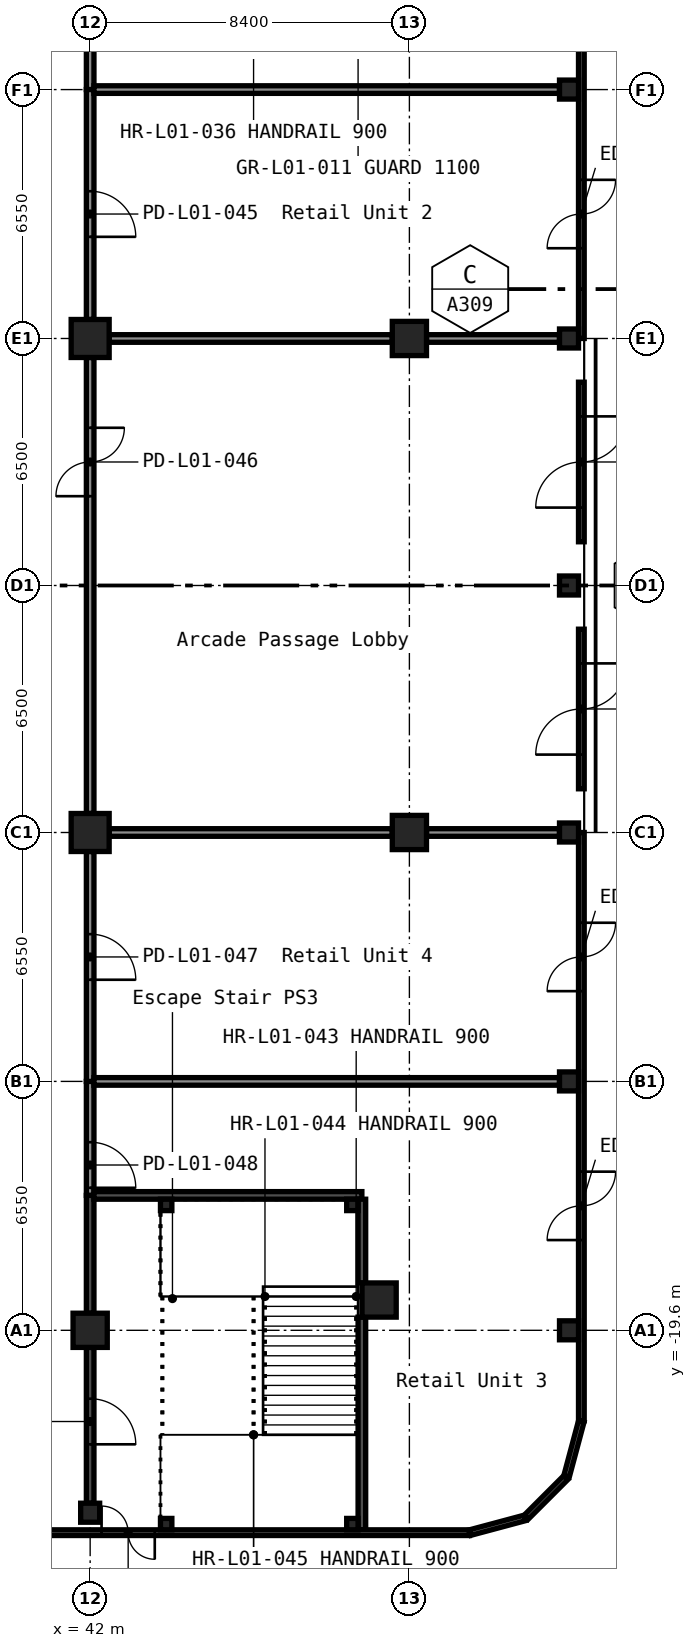
"""IFC4 building model, lengths in metres.
Left out: names, types, materials, properties, quantities, classifications, styles, units other than length and angle.
Written with IfcOpenShell. Run it as: python <this file> out.ifc"""

import sys

from ifc_helpers import new_model, si_unit, direction, frame, frame_2d, origin, origin_2d, place, context, subcontext, project, spatial, rectangle, hollow_rectangle, extrude, element, fill, save


model = new_model("IFC4")
c1 = context("Model", 3, precision=1e-05, world=origin(), true_north=direction((0.0, 1.0)))
c2 = subcontext(c1, "Body", "Model", "MODEL_VIEW")
j1 = project(units=[si_unit("LENGTHUNIT", "METRE"), si_unit("PLANEANGLEUNIT", "RADIAN")], contexts=[c1])
p1 = place(None, origin())
s1 = spatial("IfcSite", under=j1, at=p1, CompositionType="ELEMENT")
p2 = place(p1, origin())
s2 = spatial("IfcBuilding", under=s1, at=p2, CompositionType="ELEMENT")
p3 = place(p2, origin())
s3 = spatial("IfcBuildingStorey", under=s2, at=p3, CompositionType="ELEMENT", Elevation=0.0)
p4 = place(p3, frame((42.0, -19.6, -0.3), z_axis=(0.0, 0.0, 1.0), x_axis=(1.0, 0.0, 0.0)))
e1 = element("IfcColumn", 1, at=p4, inside=s3, PredefinedType="COLUMN", context=c2, shape_type="SweptSolid", body=[
    extrude(hollow_rectangle(XDim=0.9, YDim=0.9, WallThickness=0.036, at=origin_2d()), origin(), (0.0, 0.0, 1.0), 8.9),
])
for number, where, z_axis, x_axis in (
    (2, (42.0, -6.5, -0.3), (0.0, 0.0, 1.0), (1.0, 0.0, 0.0)),
    (3, (42.0, 6.5, -0.3), (0.0, 0.0, 1.0), (1.0, 0.0, 0.0)),
):
    element("IfcColumn", number, at=place(p3, frame(where, z_axis=z_axis, x_axis=x_axis)), inside=s3, PredefinedType="COLUMN", context=c2, shape_type="SweptSolid", body=[
        extrude(hollow_rectangle(XDim=1.0, YDim=1.0, WallThickness=0.04, at=origin_2d()), origin(), (0.0, 0.0, 1.0), 8.9),
    ])
for number, where, z_axis, x_axis in (
    (4, (49.603, -18.803, -0.3), (0.0, 0.0, 1.0), (1.0, 0.0, 0.0)),
    (5, (50.4, -6.5, -0.3), (0.0, 0.0, 1.0), (1.0, 0.0, 0.0)),
    (6, (50.4, 6.5, -0.3), (0.0, 0.0, 1.0), (1.0, 0.0, 0.0)),
):
    element("IfcColumn", number, at=place(p3, frame(where, z_axis=z_axis, x_axis=x_axis)), inside=s3, PredefinedType="COLUMN", context=c2, shape_type="SweptSolid", body=[
        extrude(hollow_rectangle(XDim=0.9, YDim=0.9, WallThickness=0.036, at=origin_2d()), origin(), (0.0, 0.0, 1.0), 8.9),
    ])
for number, where, z_axis, x_axis in (
    (7, (42.0, -24.4, -0.3), (0.0, 0.0, 1.0), (1.0, 0.0, 0.0)),
    (8, (54.6, -19.6, -0.3), (0.0, 0.0, 1.0), (1.0, 0.0, 0.0)),
    (9, (54.6, -13.05, -0.3), (0.0, 0.0, 1.0), (1.0, 0.0, 0.0)),
    (10, (54.6, -6.5, -0.3), (0.0, 0.0, 1.0), (1.0, 0.0, 0.0)),
    (11, (54.6, 0.0, -0.3), (0.0, 0.0, 1.0), (1.0, 0.0, 0.0)),
    (12, (54.6, 6.5, -0.3), (0.0, 0.0, 1.0), (1.0, 0.0, 0.0)),
    (13, (54.6, 13.05, -0.3), (0.0, 0.0, 1.0), (1.0, 0.0, 0.0)),
):
    element("IfcColumn", number, at=place(p3, frame(where, z_axis=z_axis, x_axis=x_axis)), inside=s3, PredefinedType="COLUMN", context=c2, shape_type="SweptSolid", body=[
        extrude(hollow_rectangle(XDim=0.5, YDim=0.5, WallThickness=0.019, InnerFilletRadius=0.029, OuterFilletRadius=0.048, at=origin_2d()), origin(), (0.0, 0.0, 1.0), 8.9),
    ])
p5 = place(p3, frame((54.35, -6.5, 0.0), z_axis=(0.0, 0.0, 1.0), x_axis=(-1.0, 0.0, 0.0)))
e14 = element("IfcWall", 14, at=p5, inside=s3, PredefinedType="PARTITIONING", context=c2, shape_type="SweptSolid", body=[
    extrude(rectangle(XDim=3.5, YDim=0.2, at=frame_2d((1.75, 0.0))), origin(), (0.0, 0.0, 1.0), 8.6),
])
p6 = place(p3, frame((49.95, -6.5, 0.0), z_axis=(0.0, 0.0, 1.0), x_axis=(-1.0, 0.0, 0.0)))
e15 = element("IfcWall", 15, at=p6, inside=s3, PredefinedType="PARTITIONING", context=c2, shape_type="SweptSolid", body=[
    extrude(rectangle(XDim=7.45, YDim=0.2, at=frame_2d((3.725, 0.0))), origin(), (0.0, 0.0, 1.0), 8.6),
])
p7 = place(p3, frame((42.0, 6.0, 0.0), z_axis=(0.0, 0.0, 1.0), x_axis=(0.0, -1.0, 0.0)))
e16 = element("IfcWall", 16, at=p7, inside=s3, PredefinedType="PARTITIONING", context=c2, shape_type="SweptSolid", body=[
    extrude(rectangle(XDim=12.0, YDim=0.2, at=frame_2d((6.0, 0.0))), origin(), (0.0, 0.0, 1.0), 8.6),
])
p8 = place(p7, frame((1.85, 0.0, 0.0)))
e17 = element("IfcOpeningElement", 17, at=p8, cuts=e16, PredefinedType="OPENING", context=c2, shape_type="SweptSolid", body=[
    extrude(rectangle(XDim=1.8, YDim=2.1, at=frame_2d((0.9, 1.05))), frame((0.0, 0.11, 0.0), z_axis=(0.0, -1.0, 0.0), x_axis=(1.0, 0.0, 0.0)), (0.0, 0.0, 1.0), 0.22),
])
p9 = place(p3, frame((42.0, 16.05, 0.0), z_axis=(0.0, 0.0, 1.0), x_axis=(0.0, -1.0, 0.0)))
e18 = element("IfcWall", 18, at=p9, inside=s3, PredefinedType="PARTITIONING", context=c2, shape_type="SweptSolid", body=[
    extrude(rectangle(XDim=3.0, YDim=0.2, at=frame_2d((1.5, 0.0))), origin(), (0.0, 0.0, 1.0), 8.6),
])
p10 = place(p9, frame((0.2, 0.0, 0.0)))
e19 = element("IfcOpeningElement", 19, at=p10, cuts=e18, PredefinedType="OPENING", context=c2, shape_type="SweptSolid", body=[
    extrude(rectangle(XDim=1.2, YDim=2.1, at=frame_2d((0.6, 1.05))), frame((0.0, 0.11, 0.0), z_axis=(0.0, -1.0, 0.0), x_axis=(1.0, 0.0, 0.0)), (0.0, 0.0, 1.0), 0.22),
])
p11 = place(p3, frame((42.0, 13.05, 0.0), z_axis=(0.0, 0.0, 1.0), x_axis=(0.0, -1.0, 0.0)))
e20 = element("IfcWall", 20, at=p11, inside=s3, PredefinedType="PARTITIONING", context=c2, shape_type="SweptSolid", body=[
    extrude(rectangle(XDim=6.05, YDim=0.2, at=frame_2d((3.025, 0.0))), origin(), (0.0, 0.0, 1.0), 8.6),
])
p12 = place(p11, frame((2.675, 0.0, 0.0)))
e21 = element("IfcOpeningElement", 21, at=p12, cuts=e20, PredefinedType="OPENING", context=c2, shape_type="SweptSolid", body=[
    extrude(rectangle(XDim=1.2, YDim=2.1, at=frame_2d((0.6, 1.05))), frame((0.0, 0.11, 0.0), z_axis=(0.0, -1.0, 0.0), x_axis=(1.0, 0.0, 0.0)), (0.0, 0.0, 1.0), 0.22),
])
p13 = place(p3, frame((42.0, -13.05, 0.0), z_axis=(0.0, 0.0, 1.0), x_axis=(0.0, -1.0, 0.0)))
e22 = element("IfcWall", 22, at=p13, inside=s3, PredefinedType="PARTITIONING", context=c2, shape_type="SweptSolid", body=[
    extrude(rectangle(XDim=3.0, YDim=0.2, at=frame_2d((1.5, 0.0))), origin(), (0.0, 0.0, 1.0), 8.6),
])
p14 = place(p13, frame((1.6, 0.0, 0.0)))
e23 = element("IfcOpeningElement", 23, at=p14, cuts=e22, PredefinedType="OPENING", context=c2, shape_type="SweptSolid", body=[
    extrude(rectangle(XDim=1.2, YDim=2.1, at=frame_2d((0.6, 1.05))), frame((0.0, 0.11, 0.0), z_axis=(0.0, -1.0, 0.0), x_axis=(1.0, 0.0, 0.0)), (0.0, 0.0, 1.0), 0.22),
])
p15 = place(p3, frame((42.0, -7.0, 0.0), z_axis=(0.0, 0.0, 1.0), x_axis=(0.0, -1.0, 0.0)))
e24 = element("IfcWall", 24, at=p15, inside=s3, PredefinedType="PARTITIONING", context=c2, shape_type="SweptSolid", body=[
    extrude(rectangle(XDim=6.05, YDim=0.2, at=frame_2d((3.025, 0.0))), origin(), (0.0, 0.0, 1.0), 8.6),
])
p16 = place(p15, frame((2.175, 0.0, 0.0)))
e25 = element("IfcOpeningElement", 25, at=p16, cuts=e24, PredefinedType="OPENING", context=c2, shape_type="SweptSolid", body=[
    extrude(rectangle(XDim=1.2, YDim=2.1, at=frame_2d((0.6, 1.05))), frame((0.0, 0.11, 0.0), z_axis=(0.0, -1.0, 0.0), x_axis=(1.0, 0.0, 0.0)), (0.0, 0.0, 1.0), 0.22),
])
p17 = place(p3, frame((42.0, -24.15, 0.0), z_axis=(0.0, 0.0, 1.0), x_axis=(0.0, 1.0, 0.0)))
e26 = element("IfcWall", 26, at=p17, inside=s3, PredefinedType="SHEAR", context=c2, shape_type="SweptSolid", body=[
    extrude(rectangle(XDim=4.1, YDim=0.2, at=frame_2d((2.05, 0.0))), origin(), (0.0, 0.0, 1.0), 8.6),
])
p18 = place(p17, frame((1.55, 0.0, 0.0)))
e27 = element("IfcOpeningElement", 27, at=p18, cuts=e26, PredefinedType="OPENING", context=c2, shape_type="SweptSolid", body=[
    extrude(rectangle(XDim=1.2, YDim=2.1, at=frame_2d((0.6, 1.05))), frame((0.0, 0.11, 0.0), z_axis=(0.0, -1.0, 0.0), x_axis=(1.0, 0.0, 0.0)), (0.0, 0.0, 1.0), 0.22),
])
p19 = place(p3, frame((42.0, -19.15, 0.0), z_axis=(0.0, 0.0, 1.0), x_axis=(0.0, 1.0, 0.0)))
e28 = element("IfcWall", 28, at=p19, inside=s3, PredefinedType="SHEAR", context=c2, shape_type="SweptSolid", body=[
    extrude(rectangle(XDim=3.1, YDim=0.2, at=frame_2d((1.55, 0.0))), origin(), (0.0, 0.0, 1.0), 8.6),
])
p20 = place(p3, frame((42.1, -16.05, 0.0), z_axis=(0.0, 0.0, 1.0), x_axis=(1.0, 0.0, 0.0)))
e29 = element("IfcWall", 29, at=p20, inside=s3, PredefinedType="SHEAR", context=c2, shape_type="SweptSolid", body=[
    extrude(rectangle(XDim=7.05, YDim=0.2, at=frame_2d((3.525, 0.0))), origin(), (0.0, 0.0, 1.0), 8.6),
])
p21 = place(p3, frame((49.15, -16.15, 0.0), z_axis=(0.0, 0.0, 1.0), x_axis=(0.0, -1.0, 0.0)))
e30 = element("IfcWall", 30, at=p21, inside=s3, PredefinedType="SHEAR", context=c2, shape_type="SweptSolid", body=[
    extrude(rectangle(XDim=2.203, YDim=0.2, at=frame_2d((1.102, 0.0))), origin(), (0.0, 0.0, 1.0), 8.6),
])
p22 = place(p3, frame((49.15, -19.253, 0.0), z_axis=(0.0, 0.0, 1.0), x_axis=(0.0, -1.0, 0.0)))
e31 = element("IfcWall", 31, at=p22, inside=s3, PredefinedType="SHEAR", context=c2, shape_type="SweptSolid", body=[
    extrude(rectangle(XDim=5.597, YDim=0.2, at=frame_2d((2.798, 0.0))), origin(), (0.0, 0.0, 1.0), 8.6),
])
p23 = place(p3, frame((54.35, 13.05, 0.0), z_axis=(0.0, 0.0, 1.0), x_axis=(-1.0, 0.0, 0.0)))
e32 = element("IfcWall", 32, at=p23, inside=s3, PredefinedType="PARTITIONING", context=c2, shape_type="SweptSolid", body=[
    extrude(rectangle(XDim=12.25, YDim=0.2, at=frame_2d((6.125, 0.0))), origin(), (0.0, 0.0, 1.0), 8.6),
])
p24 = place(p3, frame((54.35, 6.5, 0.0), z_axis=(0.0, 0.0, 1.0), x_axis=(-1.0, 0.0, 0.0)))
e33 = element("IfcWall", 33, at=p24, inside=s3, PredefinedType="PARTITIONING", context=c2, shape_type="SweptSolid", body=[
    extrude(rectangle(XDim=3.5, YDim=0.2, at=frame_2d((1.75, 0.0))), origin(), (0.0, 0.0, 1.0), 8.6),
])
p25 = place(p3, frame((49.95, 6.5, 0.0), z_axis=(0.0, 0.0, 1.0), x_axis=(-1.0, 0.0, 0.0)))
e34 = element("IfcWall", 34, at=p25, inside=s3, PredefinedType="PARTITIONING", context=c2, shape_type="SweptSolid", body=[
    extrude(rectangle(XDim=7.45, YDim=0.2, at=frame_2d((3.725, 0.0))), origin(), (0.0, 0.0, 1.0), 8.6),
])
p26 = place(p3, frame((54.35, -13.05, 0.0), z_axis=(0.0, 0.0, 1.0), x_axis=(-1.0, 0.0, 0.0)))
e35 = element("IfcWall", 35, at=p26, inside=s3, PredefinedType="PARTITIONING", context=c2, shape_type="SweptSolid", body=[
    extrude(rectangle(XDim=12.25, YDim=0.2, at=frame_2d((6.125, 0.0))), origin(), (0.0, 0.0, 1.0), 8.6),
])
p27 = place(p3, frame((54.922, -22.0, 0.0), z_axis=(0.0, 0.0, 1.0), x_axis=(-0.258741535379, -0.965946591624, 0.0)))
e36 = element("IfcWall", 36, at=p27, inside=s3, PredefinedType="STANDARD", context=c2, shape_type="SweptSolid", body=[
    extrude(rectangle(XDim=1.493, YDim=0.15, at=frame_2d((0.746, 0.0))), origin(), (0.0, 0.0, 1.0), 8.6),
])
p28 = place(p3, frame((54.517, -23.475, 0.0), z_axis=(0.0, 0.0, 1.0), x_axis=(-0.707106781187, -0.707106781187, 0.0)))
e37 = element("IfcWall", 37, at=p28, inside=s3, PredefinedType="STANDARD", context=c2, shape_type="SweptSolid", body=[
    extrude(rectangle(XDim=1.473, YDim=0.15, at=frame_2d((0.736, 0.0))), origin(), (0.0, 0.0, 1.0), 8.6),
])
p29 = place(p3, frame((53.442, -24.536, 0.0), z_axis=(0.0, 0.0, 1.0), x_axis=(-0.965946591624, -0.258741535379, 0.0)))
e38 = element("IfcWall", 38, at=p29, inside=s3, PredefinedType="STANDARD", context=c2, shape_type="SweptSolid", body=[
    extrude(rectangle(XDim=1.493, YDim=0.15, at=frame_2d((0.746, 0.0))), origin(), (0.0, 0.0, 1.0), 8.6),
])
p30 = place(p3, frame((51.98, -24.925, 0.0), z_axis=(0.0, 0.0, 1.0), x_axis=(-1.0, 0.0, 0.0)))
e39 = element("IfcWall", 39, at=p30, inside=s3, PredefinedType="STANDARD", context=c2, shape_type="SweptSolid", body=[
    extrude(rectangle(XDim=35.18, YDim=0.15, at=frame_2d((17.59, 0.0))), origin(), (0.0, 0.0, 1.0), 8.6),
])
p31 = place(p30, frame((8.28, 0.0, 0.0)))
e40 = element("IfcOpeningElement", 40, at=p31, cuts=e39, PredefinedType="OPENING", context=c2, shape_type="SweptSolid", body=[
    extrude(rectangle(XDim=1.4, YDim=2.1, at=frame_2d((0.7, 1.05))), frame((0.0, 0.085, 0.0), z_axis=(0.0, -1.0, 0.0), x_axis=(1.0, 0.0, 0.0)), (0.0, 0.0, 1.0), 0.17),
])
p32 = place(p30, frame((27.555, 0.0, 0.0)))
e41 = element("IfcOpeningElement", 41, at=p32, cuts=e39, PredefinedType="OPENING", context=c2, shape_type="SweptSolid", body=[
    extrude(rectangle(XDim=1.8, YDim=2.1, at=frame_2d((0.9, 1.05))), frame((0.0, 0.085, 0.0), z_axis=(0.0, -1.0, 0.0), x_axis=(1.0, 0.0, 0.0)), (0.0, 0.0, 1.0), 0.17),
])
p33 = place(p30, frame((31.53, 0.0, 0.0)))
e42 = element("IfcOpeningElement", 42, at=p33, cuts=e39, PredefinedType="OPENING", context=c2, shape_type="SweptSolid", body=[
    extrude(rectangle(XDim=1.8, YDim=2.1, at=frame_2d((0.9, 1.05))), frame((0.0, 0.085, 0.0), z_axis=(0.0, -1.0, 0.0), x_axis=(1.0, 0.0, 0.0)), (0.0, 0.0, 1.0), 0.17),
])
p34 = place(p30, frame((21.68, 0.0, 0.0)))
e43 = element("IfcOpeningElement", 43, at=p34, cuts=e39, PredefinedType="OPENING", context=c2, shape_type="SweptSolid", body=[
    extrude(rectangle(XDim=1.8, YDim=2.1, at=frame_2d((0.9, 1.05))), frame((0.0, 0.085, 0.0), z_axis=(0.0, -1.0, 0.0), x_axis=(1.0, 0.0, 0.0)), (0.0, 0.0, 1.0), 0.17),
])
p35 = place(p3, frame((54.925, 21.98, 0.0), z_axis=(0.0, 0.0, 1.0), x_axis=(0.0, -1.0, 0.0)))
e44 = element("IfcWall", 44, at=p35, inside=s3, PredefinedType="STANDARD", context=c2, shape_type="SweptSolid", body=[
    extrude(rectangle(XDim=15.48, YDim=0.15, at=frame_2d((7.74, 0.0))), origin(), (0.0, 0.0, 1.0), 8.6),
])
p36 = place(p35, frame((4.78, 0.0, 0.0)))
e45 = element("IfcOpeningElement", 45, at=p36, cuts=e44, PredefinedType="OPENING", context=c2, shape_type="SweptSolid", body=[
    extrude(rectangle(XDim=1.8, YDim=2.1, at=frame_2d((0.9, 1.05))), frame((0.0, 0.085, 0.0), z_axis=(0.0, -1.0, 0.0), x_axis=(1.0, 0.0, 0.0)), (0.0, 0.0, 1.0), 0.17),
])
p37 = place(p35, frame((11.305, 0.0, 0.0)))
e46 = element("IfcOpeningElement", 46, at=p37, cuts=e44, PredefinedType="OPENING", context=c2, shape_type="SweptSolid", body=[
    extrude(rectangle(XDim=1.8, YDim=2.1, at=frame_2d((0.9, 1.05))), frame((0.0, 0.085, 0.0), z_axis=(0.0, -1.0, 0.0), x_axis=(1.0, 0.0, 0.0)), (0.0, 0.0, 1.0), 0.17),
])
p38 = place(p3, frame((54.925, 5.35, 0.0), z_axis=(0.0, 0.0, 1.0), x_axis=(0.0, -1.0, 0.0)))
e47 = element("IfcWall", 47, at=p38, inside=s3, PredefinedType="STANDARD", context=c2, shape_type="SweptSolid", body=[
    extrude(rectangle(XDim=4.2, YDim=0.15, at=frame_2d((2.1, 0.0))), origin(), (0.0, 0.0, 1.0), 8.6),
])
p39 = place(p38, frame((0.9, 0.0, 0.0)))
e48 = element("IfcOpeningElement", 48, at=p39, cuts=e47, PredefinedType="OPENING", context=c2, shape_type="SweptSolid", body=[
    extrude(rectangle(XDim=2.4, YDim=2.1, at=frame_2d((1.2, 1.05))), frame((0.0, 0.085, 0.0), z_axis=(0.0, -1.0, 0.0), x_axis=(1.0, 0.0, 0.0)), (0.0, 0.0, 1.0), 0.17),
])
p40 = place(p3, frame((54.925, -1.15, 0.0), z_axis=(0.0, 0.0, 1.0), x_axis=(0.0, -1.0, 0.0)))
e49 = element("IfcWall", 49, at=p40, inside=s3, PredefinedType="STANDARD", context=c2, shape_type="SweptSolid", body=[
    extrude(rectangle(XDim=4.2, YDim=0.15, at=frame_2d((2.1, 0.0))), origin(), (0.0, 0.0, 1.0), 8.6),
])
p41 = place(p40, frame((0.9, 0.0, 0.0)))
e50 = element("IfcOpeningElement", 50, at=p41, cuts=e49, PredefinedType="OPENING", context=c2, shape_type="SweptSolid", body=[
    extrude(rectangle(XDim=2.4, YDim=2.1, at=frame_2d((1.2, 1.05))), frame((0.0, 0.085, 0.0), z_axis=(0.0, -1.0, 0.0), x_axis=(1.0, 0.0, 0.0)), (0.0, 0.0, 1.0), 0.17),
])
p42 = place(p3, frame((54.925, -6.5, 0.0), z_axis=(0.0, 0.0, 1.0), x_axis=(0.0, -1.0, 0.0)))
e51 = element("IfcWall", 51, at=p42, inside=s3, PredefinedType="STANDARD", context=c2, shape_type="SweptSolid", body=[
    extrude(rectangle(XDim=15.48, YDim=0.15, at=frame_2d((7.74, 0.0))), origin(), (0.0, 0.0, 1.0), 8.6),
])
p43 = place(p42, frame((2.375, 0.0, 0.0)))
e52 = element("IfcOpeningElement", 52, at=p43, cuts=e51, PredefinedType="OPENING", context=c2, shape_type="SweptSolid", body=[
    extrude(rectangle(XDim=1.8, YDim=2.1, at=frame_2d((0.9, 1.05))), frame((0.0, 0.085, 0.0), z_axis=(0.0, -1.0, 0.0), x_axis=(1.0, 0.0, 0.0)), (0.0, 0.0, 1.0), 0.17),
])
p44 = place(p42, frame((8.925, 0.0, 0.0)))
e53 = element("IfcOpeningElement", 53, at=p44, cuts=e51, PredefinedType="OPENING", context=c2, shape_type="SweptSolid", body=[
    extrude(rectangle(XDim=1.8, YDim=2.1, at=frame_2d((0.9, 1.05))), frame((0.0, 0.085, 0.0), z_axis=(0.0, -1.0, 0.0), x_axis=(1.0, 0.0, 0.0)), (0.0, 0.0, 1.0), 0.17),
])
for number, where, z_axis, x_axis in (
    (54, (48.9, -24.7, 0.0), (0.0, 0.0, 1.0), (1.0, 0.0, 0.0)),
    (55, (44.0, -24.7, 0.0), (0.0, 0.0, 1.0), (1.0, 0.0, 0.0)),
    (56, (48.9, -16.3, 0.0), (0.0, 0.0, 1.0), (1.0, 0.0, 0.0)),
    (57, (44.0, -16.3, 0.0), (0.0, 0.0, 1.0), (1.0, 0.0, 0.0)),
):
    element("IfcColumn", number, at=place(p3, frame(where, z_axis=z_axis, x_axis=x_axis)), inside=s3, PredefinedType="COLUMN", context=c2, shape_type="SweptSolid", body=[
        extrude(rectangle(XDim=0.3, YDim=0.3, at=origin_2d()), origin(), (0.0, 0.0, 1.0), 8.7),
    ])
p45 = place(p18, origin())
e58 = element("IfcDoor", 58, at=p45, inside=s3, OperationType="SINGLE_SWING_LEFT", PredefinedType="DOOR", context=c2, shape_type="SweptSolid", body=[
    extrude(rectangle(XDim=1.2, YDim=2.1, at=frame_2d((0.6, 1.05))), frame((0.0, 0.025, 0.0), z_axis=(0.0, -1.0, 0.0), x_axis=(1.0, 0.0, 0.0)), (0.0, 0.0, 1.0), 0.05),
])
fill(e27, e58)
p46 = place(p12, origin())
e59 = element("IfcDoor", 59, at=p46, inside=s3, OperationType="SINGLE_SWING_LEFT", PredefinedType="DOOR", context=c2, shape_type="SweptSolid", body=[
    extrude(rectangle(XDim=1.2, YDim=2.1, at=frame_2d((0.6, 1.05))), frame((0.0, 0.025, 0.0), z_axis=(0.0, -1.0, 0.0), x_axis=(1.0, 0.0, 0.0)), (0.0, 0.0, 1.0), 0.05),
])
fill(e21, e59)
p47 = place(p8, origin())
e60 = element("IfcDoor", 60, at=p47, inside=s3, OperationType="DOUBLE_DOOR_SINGLE_SWING", PredefinedType="DOOR", context=c2, shape_type="SweptSolid", body=[
    extrude(rectangle(XDim=1.8, YDim=2.1, at=frame_2d((0.9, 1.05))), frame((0.0, 0.025, 0.0), z_axis=(0.0, -1.0, 0.0), x_axis=(1.0, 0.0, 0.0)), (0.0, 0.0, 1.0), 0.05),
])
fill(e17, e60)
p48 = place(p16, origin())
e61 = element("IfcDoor", 61, at=p48, inside=s3, OperationType="SINGLE_SWING_LEFT", PredefinedType="DOOR", context=c2, shape_type="SweptSolid", body=[
    extrude(rectangle(XDim=1.2, YDim=2.1, at=frame_2d((0.6, 1.05))), frame((0.0, 0.025, 0.0), z_axis=(0.0, -1.0, 0.0), x_axis=(1.0, 0.0, 0.0)), (0.0, 0.0, 1.0), 0.05),
])
fill(e25, e61)
p49 = place(p14, origin())
e62 = element("IfcDoor", 62, at=p49, inside=s3, OperationType="SINGLE_SWING_LEFT", PredefinedType="DOOR", context=c2, shape_type="SweptSolid", body=[
    extrude(rectangle(XDim=1.2, YDim=2.1, at=frame_2d((0.6, 1.05))), frame((0.0, 0.025, 0.0), z_axis=(0.0, -1.0, 0.0), x_axis=(1.0, 0.0, 0.0)), (0.0, 0.0, 1.0), 0.05),
])
fill(e23, e62)
p50 = place(p31, origin())
e63 = element("IfcDoor", 63, at=p50, inside=s3, OperationType="DOUBLE_DOOR_SINGLE_SWING", PredefinedType="DOOR", context=c2, shape_type="SweptSolid", body=[
    extrude(rectangle(XDim=1.4, YDim=2.1, at=frame_2d((0.7, 1.05))), frame((0.0, 0.025, 0.0), z_axis=(0.0, -1.0, 0.0), x_axis=(1.0, 0.0, 0.0)), (0.0, 0.0, 1.0), 0.05),
])
fill(e40, e63)
p51 = place(p37, origin())
e64 = element("IfcDoor", 64, at=p51, inside=s3, OperationType="DOUBLE_DOOR_DOUBLE_SWING", PredefinedType="DOOR", context=c2, shape_type="SweptSolid", body=[
    extrude(rectangle(XDim=1.8, YDim=2.1, at=frame_2d((0.9, 1.05))), frame((0.0, 0.025, 0.0), z_axis=(0.0, -1.0, 0.0), x_axis=(1.0, 0.0, 0.0)), (0.0, 0.0, 1.0), 0.05),
])
fill(e46, e64)
p52 = place(p39, origin())
e65 = element("IfcDoor", 65, at=p52, inside=s3, OperationType="DOUBLE_DOOR_DOUBLE_SWING", PredefinedType="DOOR", context=c2, shape_type="SweptSolid", body=[
    extrude(rectangle(XDim=2.4, YDim=2.1, at=frame_2d((1.2, 1.05))), frame((0.0, 0.025, 0.0), z_axis=(0.0, -1.0, 0.0), x_axis=(1.0, 0.0, 0.0)), (0.0, 0.0, 1.0), 0.05),
])
fill(e48, e65)
p53 = place(p41, origin())
e66 = element("IfcDoor", 66, at=p53, inside=s3, OperationType="DOUBLE_DOOR_DOUBLE_SWING", PredefinedType="DOOR", context=c2, shape_type="SweptSolid", body=[
    extrude(rectangle(XDim=2.4, YDim=2.1, at=frame_2d((1.2, 1.05))), frame((0.0, 0.025, 0.0), z_axis=(0.0, -1.0, 0.0), x_axis=(1.0, 0.0, 0.0)), (0.0, 0.0, 1.0), 0.05),
])
fill(e50, e66)
p54 = place(p43, origin())
e67 = element("IfcDoor", 67, at=p54, inside=s3, OperationType="DOUBLE_DOOR_DOUBLE_SWING", PredefinedType="DOOR", context=c2, shape_type="SweptSolid", body=[
    extrude(rectangle(XDim=1.8, YDim=2.1, at=frame_2d((0.9, 1.05))), frame((0.0, 0.025, 0.0), z_axis=(0.0, -1.0, 0.0), x_axis=(1.0, 0.0, 0.0)), (0.0, 0.0, 1.0), 0.05),
])
fill(e52, e67)
p55 = place(p44, origin())
e68 = element("IfcDoor", 68, at=p55, inside=s3, OperationType="DOUBLE_DOOR_DOUBLE_SWING", PredefinedType="DOOR", context=c2, shape_type="SweptSolid", body=[
    extrude(rectangle(XDim=1.8, YDim=2.1, at=frame_2d((0.9, 1.05))), frame((0.0, 0.025, 0.0), z_axis=(0.0, -1.0, 0.0), x_axis=(1.0, 0.0, 0.0)), (0.0, 0.0, 1.0), 0.05),
])
fill(e53, e68)
save(model, sys.argv[1])
